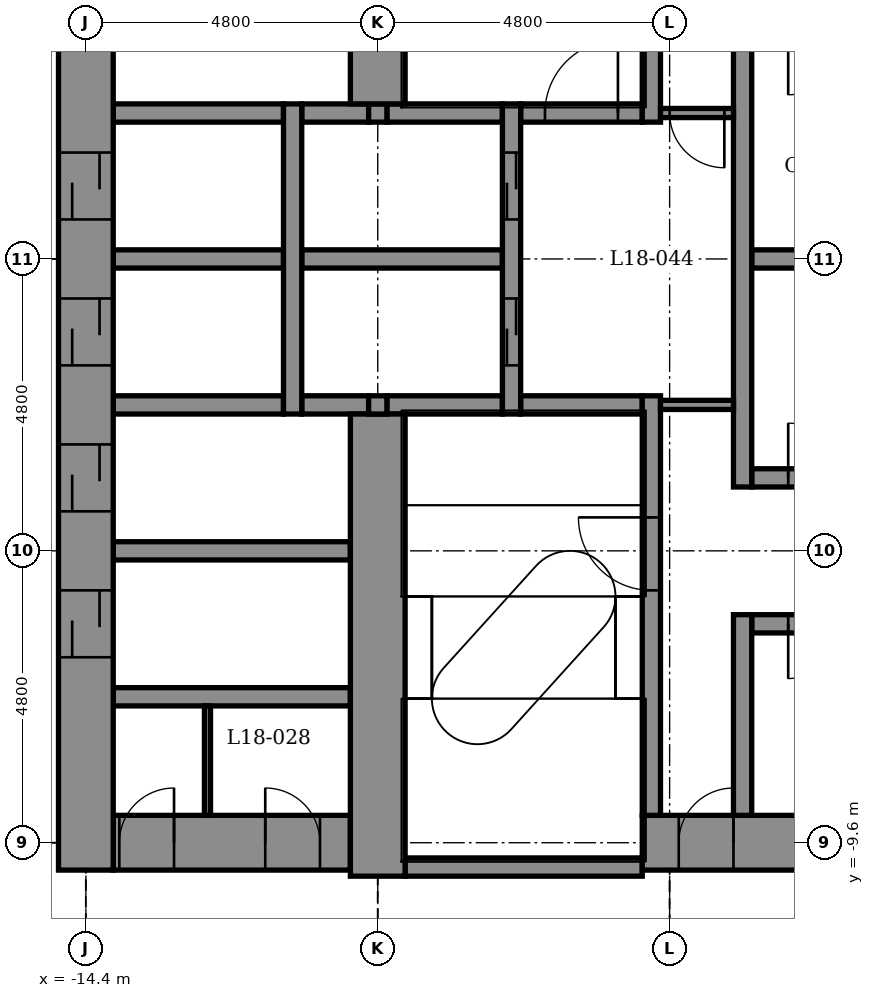
"""IFC4 building model, lengths in metres.
Left out: names, types, materials, properties, quantities, classifications, styles, units other than length and angle.
Written with IfcOpenShell. Run it as: python <this file> out.ifc"""

import sys

from ifc_helpers import new_model, si_unit, direction, frame, frame_2d, origin, place, context, subcontext, project, spatial, rectangle, extrude, element, fill, save


model = new_model("IFC4")
c1 = context("Model", 3, precision=1e-05, world=origin(), true_north=direction((0.0, 1.0)))
c2 = subcontext(c1, "Body", "Model", "MODEL_VIEW")
j1 = project(units=[si_unit("LENGTHUNIT", "METRE"), si_unit("PLANEANGLEUNIT", "RADIAN")], contexts=[c1])
p1 = place(None, origin())
s1 = spatial("IfcSite", under=j1, at=p1, CompositionType="ELEMENT")
p2 = place(p1, origin())
s2 = spatial("IfcBuilding", under=s1, at=p2, CompositionType="ELEMENT")
p3 = place(p2, frame((0.0, 0.0, 95.9)))
s3 = spatial("IfcBuildingStorey", under=s2, at=p3, CompositionType="ELEMENT", Elevation=95.9)
p4 = place(p3, frame((-9.15, -10.0, -0.2), z_axis=(0.0, 0.0, 1.0), x_axis=(1.0, 0.0, 0.0)))
e1 = element("IfcWall", 1, at=p4, inside=s3, PredefinedType="STANDARD", context=c2, shape_type="SweptSolid", body=[
    extrude(rectangle(XDim=3.9, YDim=0.3, at=frame_2d((1.95, 0.0))), origin(), (0.0, 0.0, 1.0), 4.5),
])
p5 = place(p3, frame((-13.95, -9.6, -0.2), z_axis=(0.0, 0.0, 1.0), x_axis=(1.0, 0.0, 0.0)))
e2 = element("IfcWall", 2, at=p5, inside=s3, PredefinedType="SHEAR", context=c2, shape_type="SweptSolid", body=[
    extrude(rectangle(XDim=3.9, YDim=0.9, at=frame_2d((1.95, 0.0))), origin(), (0.0, 0.0, 1.0), 4.5),
])
p6 = place(p5, frame((0.1, 0.0, 0.2)))
e3 = element("IfcOpeningElement", 3, at=p6, cuts=e2, PredefinedType="OPENING", context=c2, shape_type="SweptSolid", body=[
    extrude(rectangle(XDim=0.9, YDim=2.1, at=frame_2d((0.45, 1.05))), frame((0.0, 0.46, 0.0), z_axis=(0.0, -1.0, 0.0), x_axis=(1.0, 0.0, 0.0)), (0.0, 0.0, 1.0), 0.92),
])
p7 = place(p5, frame((2.5, 0.0, 0.2)))
e4 = element("IfcOpeningElement", 4, at=p7, cuts=e2, PredefinedType="OPENING", context=c2, shape_type="SweptSolid", body=[
    extrude(rectangle(XDim=0.9, YDim=2.1, at=frame_2d((0.45, 1.05))), frame((0.0, 0.46, 0.0), z_axis=(0.0, -1.0, 0.0), x_axis=(1.0, 0.0, 0.0)), (0.0, 0.0, 1.0), 0.92),
])
p8 = place(p3, frame((-5.25, -9.6, -0.2), z_axis=(0.0, 0.0, 1.0), x_axis=(1.0, 0.0, 0.0)))
e5 = element("IfcWall", 5, at=p8, inside=s3, PredefinedType="SHEAR", context=c2, shape_type="SweptSolid", body=[
    extrude(rectangle(XDim=10.2, YDim=0.9, at=frame_2d((5.1, 0.0))), origin(), (0.0, 0.0, 1.0), 4.5),
])
p9 = place(p8, frame((0.6, 0.0, 0.2)))
e6 = element("IfcOpeningElement", 6, at=p9, cuts=e5, PredefinedType="OPENING", context=c2, shape_type="SweptSolid", body=[
    extrude(rectangle(XDim=0.9, YDim=2.1, at=frame_2d((0.45, 1.05))), frame((0.0, 0.46, 0.0), z_axis=(0.0, -1.0, 0.0), x_axis=(1.0, 0.0, 0.0)), (0.0, 0.0, 1.0), 0.92),
])
p10 = place(p3, frame((-13.95, -7.2, -0.2), z_axis=(0.0, 0.0, 1.0), x_axis=(1.0, 0.0, 0.0)))
e7 = element("IfcWall", 7, at=p10, inside=s3, PredefinedType="STANDARD", context=c2, shape_type="SweptSolid", body=[
    extrude(rectangle(XDim=3.9, YDim=0.3, at=frame_2d((1.95, 0.0))), origin(), (0.0, 0.0, 1.0), 4.5),
])
p11 = place(p3, frame((-3.45, -6.0, -0.2), z_axis=(0.0, 0.0, 1.0), x_axis=(1.0, 0.0, 0.0)))
e8 = element("IfcWall", 8, at=p11, inside=s3, PredefinedType="STANDARD", context=c2, shape_type="SweptSolid", body=[
    extrude(rectangle(XDim=2.1, YDim=0.3, at=frame_2d((1.05, 0.0))), origin(), (0.0, 0.0, 1.0), 4.5),
])
p12 = place(p11, frame((0.6, 0.0, 0.2)))
e9 = element("IfcOpeningElement", 9, at=p12, cuts=e8, PredefinedType="OPENING", context=c2, shape_type="SweptSolid", body=[
    extrude(rectangle(XDim=0.9, YDim=2.1, at=frame_2d((0.45, 1.05))), frame((0.0, 0.16, 0.0), z_axis=(0.0, -1.0, 0.0), x_axis=(1.0, 0.0, 0.0)), (0.0, 0.0, 1.0), 0.32),
])
p13 = place(p3, frame((-13.95, -4.8, -0.2), z_axis=(0.0, 0.0, 1.0), x_axis=(1.0, 0.0, 0.0)))
e10 = element("IfcWall", 10, at=p13, inside=s3, PredefinedType="STANDARD", context=c2, shape_type="SweptSolid", body=[
    extrude(rectangle(XDim=3.9, YDim=0.3, at=frame_2d((1.95, 0.0))), origin(), (0.0, 0.0, 1.0), 4.5),
])
p14 = place(p3, frame((-3.45, -3.6, -0.2), z_axis=(0.0, 0.0, 1.0), x_axis=(1.0, 0.0, 0.0)))
e11 = element("IfcWall", 11, at=p14, inside=s3, PredefinedType="STANDARD", context=c2, shape_type="SweptSolid", body=[
    extrude(rectangle(XDim=2.1, YDim=0.3, at=frame_2d((1.05, 0.0))), origin(), (0.0, 0.0, 1.0), 4.5),
])
p15 = place(p14, frame((0.6, 0.0, 0.2)))
e12 = element("IfcOpeningElement", 12, at=p15, cuts=e11, PredefinedType="OPENING", context=c2, shape_type="SweptSolid", body=[
    extrude(rectangle(XDim=0.9, YDim=2.1, at=frame_2d((0.45, 1.05))), frame((0.0, 0.16, 0.0), z_axis=(0.0, -1.0, 0.0), x_axis=(1.0, 0.0, 0.0)), (0.0, 0.0, 1.0), 0.32),
])
p16 = place(p3, frame((-13.95, -2.4, -0.2), z_axis=(0.0, 0.0, 1.0), x_axis=(1.0, 0.0, 0.0)))
e13 = element("IfcWall", 13, at=p16, inside=s3, PredefinedType="STANDARD", context=c2, shape_type="SweptSolid", body=[
    extrude(rectangle(XDim=2.8, YDim=0.3, at=frame_2d((1.4, 0.0))), origin(), (0.0, 0.0, 1.0), 4.5),
])
p17 = place(p3, frame((-10.85, -2.4, -0.2), z_axis=(0.0, 0.0, 1.0), x_axis=(1.0, 0.0, 0.0)))
e14 = element("IfcWall", 14, at=p17, inside=s3, PredefinedType="STANDARD", context=c2, shape_type="SweptSolid", body=[
    extrude(rectangle(XDim=1.1, YDim=0.3, at=frame_2d((0.55, 0.0))), origin(), (0.0, 0.0, 1.0), 4.5),
])
p18 = place(p3, frame((-9.45, -2.4, -0.2), z_axis=(0.0, 0.0, 1.0), x_axis=(1.0, 0.0, 0.0)))
e15 = element("IfcWall", 15, at=p18, inside=s3, PredefinedType="STANDARD", context=c2, shape_type="SweptSolid", body=[
    extrude(rectangle(XDim=1.9, YDim=0.3, at=frame_2d((0.95, 0.0))), origin(), (0.0, 0.0, 1.0), 4.5),
])
p19 = place(p3, frame((-7.25, -2.4, -0.2), z_axis=(0.0, 0.0, 1.0), x_axis=(1.0, 0.0, 0.0)))
e16 = element("IfcWall", 16, at=p19, inside=s3, PredefinedType="STANDARD", context=c2, shape_type="SweptSolid", body=[
    extrude(rectangle(XDim=2.0, YDim=0.3, at=frame_2d((1.0, 0.0))), origin(), (0.0, 0.0, 1.0), 4.5),
])
p20 = place(p3, frame((-13.95, 0.0, -0.2), z_axis=(0.0, 0.0, 1.0), x_axis=(1.0, 0.0, 0.0)))
e17 = element("IfcWall", 17, at=p20, inside=s3, PredefinedType="STANDARD", context=c2, shape_type="SweptSolid", body=[
    extrude(rectangle(XDim=2.8, YDim=0.3, at=frame_2d((1.4, 0.0))), origin(), (0.0, 0.0, 1.0), 4.5),
])
p21 = place(p3, frame((-10.85, 0.0, -0.2), z_axis=(0.0, 0.0, 1.0), x_axis=(1.0, 0.0, 0.0)))
e18 = element("IfcWall", 18, at=p21, inside=s3, PredefinedType="STANDARD", context=c2, shape_type="SweptSolid", body=[
    extrude(rectangle(XDim=3.3, YDim=0.3, at=frame_2d((1.65, 0.0))), origin(), (0.0, 0.0, 1.0), 4.5),
])
p22 = place(p3, frame((-3.45, 0.0, -0.2), z_axis=(0.0, 0.0, 1.0), x_axis=(1.0, 0.0, 0.0)))
e19 = element("IfcWall", 19, at=p22, inside=s3, PredefinedType="STANDARD", context=c2, shape_type="SweptSolid", body=[
    extrude(rectangle(XDim=2.1, YDim=0.3, at=frame_2d((1.05, 0.0))), origin(), (0.0, 0.0, 1.0), 4.5),
])
p23 = place(p3, frame((-13.95, 2.4, -0.2), z_axis=(0.0, 0.0, 1.0), x_axis=(1.0, 0.0, 0.0)))
e20 = element("IfcWall", 20, at=p23, inside=s3, PredefinedType="STANDARD", context=c2, shape_type="SweptSolid", body=[
    extrude(rectangle(XDim=2.8, YDim=0.3, at=frame_2d((1.4, 0.0))), origin(), (0.0, 0.0, 1.0), 4.5),
])
p24 = place(p3, frame((-10.85, 2.4, -0.2), z_axis=(0.0, 0.0, 1.0), x_axis=(1.0, 0.0, 0.0)))
e21 = element("IfcWall", 21, at=p24, inside=s3, PredefinedType="STANDARD", context=c2, shape_type="SweptSolid", body=[
    extrude(rectangle(XDim=1.1, YDim=0.3, at=frame_2d((0.55, 0.0))), origin(), (0.0, 0.0, 1.0), 4.5),
])
p25 = place(p3, frame((-9.45, 2.4, -0.2), z_axis=(0.0, 0.0, 1.0), x_axis=(1.0, 0.0, 0.0)))
e22 = element("IfcWall", 22, at=p25, inside=s3, PredefinedType="STANDARD", context=c2, shape_type="SweptSolid", body=[
    extrude(rectangle(XDim=1.9, YDim=0.3, at=frame_2d((0.95, 0.0))), origin(), (0.0, 0.0, 1.0), 4.5),
])
p26 = place(p3, frame((-7.25, 2.4, -0.2), z_axis=(0.0, 0.0, 1.0), x_axis=(1.0, 0.0, 0.0)))
e23 = element("IfcWall", 23, at=p26, inside=s3, PredefinedType="STANDARD", context=c2, shape_type="SweptSolid", body=[
    extrude(rectangle(XDim=2.0, YDim=0.3, at=frame_2d((1.0, 0.0))), origin(), (0.0, 0.0, 1.0), 4.5),
])
p27 = place(p26, frame((0.4, 0.0, 0.2)))
e24 = element("IfcOpeningElement", 24, at=p27, cuts=e23, PredefinedType="OPENING", context=c2, shape_type="SweptSolid", body=[
    extrude(rectangle(XDim=1.2, YDim=2.1, at=frame_2d((0.6, 1.05))), frame((0.0, 0.16, 0.0), z_axis=(0.0, -1.0, 0.0), x_axis=(1.0, 0.0, 0.0)), (0.0, 0.0, 1.0), 0.32),
])
p28 = place(p3, frame((-14.4, -10.05, -0.2), z_axis=(0.0, 0.0, 1.0), x_axis=(0.0, 1.0, 0.0)))
e25 = element("IfcWall", 25, at=p28, inside=s3, PredefinedType="SHEAR", context=c2, shape_type="SweptSolid", body=[
    extrude(rectangle(XDim=20.1, YDim=0.9, at=frame_2d((10.05, 0.0))), origin(), (0.0, 0.0, 1.0), 4.5),
])
p29 = place(p28, frame((3.5, 0.0, 0.2)))
e26 = element("IfcOpeningElement", 26, at=p29, cuts=e25, PredefinedType="OPENING", context=c2, shape_type="SweptSolid", body=[
    extrude(rectangle(XDim=1.1, YDim=2.1, at=frame_2d((0.55, 1.05))), frame((0.0, 0.46, 0.0), z_axis=(0.0, -1.0, 0.0), x_axis=(1.0, 0.0, 0.0)), (0.0, 0.0, 1.0), 0.92),
])
p30 = place(p28, frame((5.9, 0.0, 0.2)))
e27 = element("IfcOpeningElement", 27, at=p30, cuts=e25, PredefinedType="OPENING", context=c2, shape_type="SweptSolid", body=[
    extrude(rectangle(XDim=1.1, YDim=2.1, at=frame_2d((0.55, 1.05))), frame((0.0, 0.46, 0.0), z_axis=(0.0, -1.0, 0.0), x_axis=(1.0, 0.0, 0.0)), (0.0, 0.0, 1.0), 0.92),
])
p31 = place(p28, frame((8.3, 0.0, 0.2)))
e28 = element("IfcOpeningElement", 28, at=p31, cuts=e25, PredefinedType="OPENING", context=c2, shape_type="SweptSolid", body=[
    extrude(rectangle(XDim=1.1, YDim=2.1, at=frame_2d((0.55, 1.05))), frame((0.0, 0.46, 0.0), z_axis=(0.0, -1.0, 0.0), x_axis=(1.0, 0.0, 0.0)), (0.0, 0.0, 1.0), 0.92),
])
p32 = place(p28, frame((10.7, 0.0, 0.2)))
e29 = element("IfcOpeningElement", 29, at=p32, cuts=e25, PredefinedType="OPENING", context=c2, shape_type="SweptSolid", body=[
    extrude(rectangle(XDim=1.1, YDim=2.1, at=frame_2d((0.55, 1.05))), frame((0.0, 0.46, 0.0), z_axis=(0.0, -1.0, 0.0), x_axis=(1.0, 0.0, 0.0)), (0.0, 0.0, 1.0), 0.92),
])
p33 = place(p3, frame((-11.0, -2.55, -0.2), z_axis=(0.0, 0.0, 1.0), x_axis=(0.0, 1.0, 0.0)))
e30 = element("IfcWall", 30, at=p33, inside=s3, PredefinedType="STANDARD", context=c2, shape_type="SweptSolid", body=[
    extrude(rectangle(XDim=5.1, YDim=0.3, at=frame_2d((2.55, 0.0))), origin(), (0.0, 0.0, 1.0), 4.5),
])
p34 = place(p3, frame((-9.6, -10.15, -0.2), z_axis=(0.0, 0.0, 1.0), x_axis=(0.0, 1.0, 0.0)))
e31 = element("IfcWall", 31, at=p34, inside=s3, PredefinedType="SHEAR", context=c2, shape_type="SweptSolid", body=[
    extrude(rectangle(XDim=7.6, YDim=0.9, at=frame_2d((3.8, 0.0))), origin(), (0.0, 0.0, 1.0), 4.5),
])
for number, where, z_axis, x_axis in (
    (32, (-9.6, -2.55, -0.2), (0.0, 0.0, 1.0), (0.0, 1.0, 0.0)),
    (33, (-9.6, 2.25, -0.2), (0.0, 0.0, 1.0), (0.0, 1.0, 0.0)),
):
    element("IfcWall", number, at=place(p3, frame(where, z_axis=z_axis, x_axis=x_axis)), inside=s3, PredefinedType="STANDARD", context=c2, shape_type="SweptSolid", body=[
        extrude(rectangle(XDim=0.3, YDim=0.3, at=frame_2d((0.15, 0.0))), origin(), (0.0, 0.0, 1.0), 4.5),
    ])
p35 = place(p3, frame((-9.6, 2.55, -0.2), z_axis=(0.0, 0.0, 1.0), x_axis=(0.0, 1.0, 0.0)))
e34 = element("IfcWall", 34, at=p35, inside=s3, PredefinedType="SHEAR", context=c2, shape_type="SweptSolid", body=[
    extrude(rectangle(XDim=7.6, YDim=0.9, at=frame_2d((3.8, 0.0))), origin(), (0.0, 0.0, 1.0), 4.5),
])
p36 = place(p3, frame((-7.4, -2.55, -0.2), z_axis=(0.0, 0.0, 1.0), x_axis=(0.0, 1.0, 0.0)))
e35 = element("IfcWall", 35, at=p36, inside=s3, PredefinedType="STANDARD", context=c2, shape_type="SweptSolid", body=[
    extrude(rectangle(XDim=5.1, YDim=0.3, at=frame_2d((2.55, 0.0))), origin(), (0.0, 0.0, 1.0), 4.5),
])
p37 = place(p36, frame((0.8, 0.0, 0.2)))
e36 = element("IfcOpeningElement", 36, at=p37, cuts=e35, PredefinedType="OPENING", context=c2, shape_type="SweptSolid", body=[
    extrude(rectangle(XDim=1.1, YDim=2.1, at=frame_2d((0.55, 1.05))), frame((0.0, 0.16, 0.0), z_axis=(0.0, -1.0, 0.0), x_axis=(1.0, 0.0, 0.0)), (0.0, 0.0, 1.0), 0.32),
])
p38 = place(p36, frame((3.2, 0.0, 0.2)))
e37 = element("IfcOpeningElement", 37, at=p38, cuts=e35, PredefinedType="OPENING", context=c2, shape_type="SweptSolid", body=[
    extrude(rectangle(XDim=1.1, YDim=2.1, at=frame_2d((0.55, 1.05))), frame((0.0, 0.16, 0.0), z_axis=(0.0, -1.0, 0.0), x_axis=(1.0, 0.0, 0.0)), (0.0, 0.0, 1.0), 0.32),
])
p39 = place(p3, frame((-5.1, -9.15, -0.2), z_axis=(0.0, 0.0, 1.0), x_axis=(0.0, 1.0, 0.0)))
e38 = element("IfcWall", 38, at=p39, inside=s3, PredefinedType="STANDARD", context=c2, shape_type="SweptSolid", body=[
    extrude(rectangle(XDim=6.9, YDim=0.3, at=frame_2d((3.45, 0.0))), origin(), (0.0, 0.0, 1.0), 4.5),
])
p40 = place(p39, frame((3.7, 0.0, 0.2)))
e39 = element("IfcOpeningElement", 39, at=p40, cuts=e38, PredefinedType="OPENING", context=c2, shape_type="SweptSolid", body=[
    extrude(rectangle(XDim=1.2, YDim=2.1, at=frame_2d((0.6, 1.05))), frame((0.0, 0.16, 0.0), z_axis=(0.0, -1.0, 0.0), x_axis=(1.0, 0.0, 0.0)), (0.0, 0.0, 1.0), 0.32),
])
p41 = place(p3, frame((-5.1, 2.25, -0.2), z_axis=(0.0, 0.0, 1.0), x_axis=(0.0, 1.0, 0.0)))
e40 = element("IfcWall", 40, at=p41, inside=s3, PredefinedType="STANDARD", context=c2, shape_type="SweptSolid", body=[
    extrude(rectangle(XDim=6.9, YDim=0.3, at=frame_2d((3.45, 0.0))), origin(), (0.0, 0.0, 1.0), 4.5),
])
p42 = place(p41, frame((2.0, 0.0, 0.2)))
e41 = element("IfcOpeningElement", 41, at=p42, cuts=e40, PredefinedType="OPENING", context=c2, shape_type="SweptSolid", body=[
    extrude(rectangle(XDim=1.2, YDim=2.1, at=frame_2d((0.6, 1.05))), frame((0.0, 0.16, 0.0), z_axis=(0.0, -1.0, 0.0), x_axis=(1.0, 0.0, 0.0)), (0.0, 0.0, 1.0), 0.32),
])
p43 = place(p3, frame((-3.6, -9.15, -0.2), z_axis=(0.0, 0.0, 1.0), x_axis=(0.0, 1.0, 0.0)))
e42 = element("IfcWall", 42, at=p43, inside=s3, PredefinedType="STANDARD", context=c2, shape_type="SweptSolid", body=[
    extrude(rectangle(XDim=3.3, YDim=0.3, at=frame_2d((1.65, 0.0))), origin(), (0.0, 0.0, 1.0), 4.5),
])
p44 = place(p3, frame((-3.6, -3.75, -0.2), z_axis=(0.0, 0.0, 1.0), x_axis=(0.0, 1.0, 0.0)))
e43 = element("IfcWall", 43, at=p44, inside=s3, PredefinedType="STANDARD", context=c2, shape_type="SweptSolid", body=[
    extrude(rectangle(XDim=7.5, YDim=0.3, at=frame_2d((3.75, 0.0))), origin(), (0.0, 0.0, 1.0), 4.5),
])
p45 = place(p3, frame((-12.4, -9.15, 0.0), z_axis=(0.0, 0.0, 1.0), x_axis=(0.0, 1.0, 0.0)))
e44 = element("IfcWall", 44, at=p45, inside=s3, PredefinedType="PARTITIONING", context=c2, shape_type="SweptSolid", body=[
    extrude(rectangle(XDim=1.8, YDim=0.1, at=frame_2d((0.9, 0.0))), origin(), (0.0, 0.0, 1.0), 4.3),
])
p46 = place(p3, frame((-4.95, 2.4, 0.0), z_axis=(0.0, 0.0, 1.0), x_axis=(1.0, 0.0, 0.0)))
e45 = element("IfcWall", 45, at=p46, inside=s3, PredefinedType="PARTITIONING", context=c2, shape_type="SweptSolid", body=[
    extrude(rectangle(XDim=1.2, YDim=0.15, at=frame_2d((0.6, 0.0))), origin(), (0.0, 0.0, 1.0), 4.3),
])
p47 = place(p46, frame((0.15, 0.0, 0.0)))
e46 = element("IfcOpeningElement", 46, at=p47, cuts=e45, PredefinedType="OPENING", context=c2, shape_type="SweptSolid", body=[
    extrude(rectangle(XDim=0.9, YDim=2.1, at=frame_2d((0.45, 1.05))), frame((0.0, 0.085, 0.0), z_axis=(0.0, -1.0, 0.0), x_axis=(1.0, 0.0, 0.0)), (0.0, 0.0, 1.0), 0.17),
])
p48 = place(p3, frame((-4.95, -2.4, 0.0), z_axis=(0.0, 0.0, 1.0), x_axis=(1.0, 0.0, 0.0)))
e47 = element("IfcWall", 47, at=p48, inside=s3, PredefinedType="PARTITIONING", context=c2, shape_type="SweptSolid", body=[
    extrude(rectangle(XDim=1.2, YDim=0.15, at=frame_2d((0.6, 0.0))), origin(), (0.0, 0.0, 1.0), 4.3),
])
p49 = place(p37, origin())
e48 = element("IfcDoor", 48, at=p49, inside=s3, OperationType="DOUBLE_DOOR_SLIDING", PredefinedType="DOOR", context=c2, shape_type="SweptSolid", body=[
    extrude(rectangle(XDim=1.1, YDim=2.1, at=frame_2d((0.55, 1.05))), frame((0.0, 0.025, 0.0), z_axis=(0.0, -1.0, 0.0), x_axis=(1.0, 0.0, 0.0)), (0.0, 0.0, 1.0), 0.05),
])
fill(e36, e48)
p50 = place(p38, origin())
e49 = element("IfcDoor", 49, at=p50, inside=s3, OperationType="DOUBLE_DOOR_SLIDING", PredefinedType="DOOR", context=c2, shape_type="SweptSolid", body=[
    extrude(rectangle(XDim=1.1, YDim=2.1, at=frame_2d((0.55, 1.05))), frame((0.0, 0.025, 0.0), z_axis=(0.0, -1.0, 0.0), x_axis=(1.0, 0.0, 0.0)), (0.0, 0.0, 1.0), 0.05),
])
fill(e37, e49)
p51 = place(p29, origin())
e50 = element("IfcDoor", 50, at=p51, inside=s3, OperationType="DOUBLE_DOOR_SLIDING", PredefinedType="DOOR", context=c2, shape_type="SweptSolid", body=[
    extrude(rectangle(XDim=1.1, YDim=2.1, at=frame_2d((0.55, 1.05))), frame((0.0, 0.025, 0.0), z_axis=(0.0, -1.0, 0.0), x_axis=(1.0, 0.0, 0.0)), (0.0, 0.0, 1.0), 0.05),
])
fill(e26, e50)
p52 = place(p30, origin())
e51 = element("IfcDoor", 51, at=p52, inside=s3, OperationType="DOUBLE_DOOR_SLIDING", PredefinedType="DOOR", context=c2, shape_type="SweptSolid", body=[
    extrude(rectangle(XDim=1.1, YDim=2.1, at=frame_2d((0.55, 1.05))), frame((0.0, 0.025, 0.0), z_axis=(0.0, -1.0, 0.0), x_axis=(1.0, 0.0, 0.0)), (0.0, 0.0, 1.0), 0.05),
])
fill(e27, e51)
p53 = place(p31, origin())
e52 = element("IfcDoor", 52, at=p53, inside=s3, OperationType="DOUBLE_DOOR_SLIDING", PredefinedType="DOOR", context=c2, shape_type="SweptSolid", body=[
    extrude(rectangle(XDim=1.1, YDim=2.1, at=frame_2d((0.55, 1.05))), frame((0.0, 0.025, 0.0), z_axis=(0.0, -1.0, 0.0), x_axis=(1.0, 0.0, 0.0)), (0.0, 0.0, 1.0), 0.05),
])
fill(e28, e52)
p54 = place(p32, origin())
e53 = element("IfcDoor", 53, at=p54, inside=s3, OperationType="DOUBLE_DOOR_SLIDING", PredefinedType="DOOR", context=c2, shape_type="SweptSolid", body=[
    extrude(rectangle(XDim=1.1, YDim=2.1, at=frame_2d((0.55, 1.05))), frame((0.0, 0.025, 0.0), z_axis=(0.0, -1.0, 0.0), x_axis=(1.0, 0.0, 0.0)), (0.0, 0.0, 1.0), 0.05),
])
fill(e29, e53)
p55 = place(p40, origin())
e54 = element("IfcDoor", 54, at=p55, inside=s3, OperationType="SINGLE_SWING_RIGHT", PredefinedType="DOOR", context=c2, shape_type="SweptSolid", body=[
    extrude(rectangle(XDim=1.2, YDim=2.1, at=frame_2d((0.6, 1.05))), frame((0.0, 0.025, 0.0), z_axis=(0.0, -1.0, 0.0), x_axis=(1.0, 0.0, 0.0)), (0.0, 0.0, 1.0), 0.05),
])
fill(e39, e54)
p56 = place(p15, origin())
e55 = element("IfcDoor", 55, at=p56, inside=s3, OperationType="SINGLE_SWING_LEFT", PredefinedType="DOOR", context=c2, shape_type="SweptSolid", body=[
    extrude(rectangle(XDim=0.9, YDim=2.1, at=frame_2d((0.45, 1.05))), frame((0.0, 0.025, 0.0), z_axis=(0.0, -1.0, 0.0), x_axis=(1.0, 0.0, 0.0)), (0.0, 0.0, 1.0), 0.05),
])
fill(e12, e55)
p57 = place(p12, frame((0.9, 0.0, 0.0), z_axis=(0.0, 0.0, 1.0), x_axis=(-1.0, 0.0, 0.0)))
e56 = element("IfcDoor", 56, at=p57, inside=s3, OperationType="SINGLE_SWING_LEFT", PredefinedType="DOOR", context=c2, shape_type="SweptSolid", body=[
    extrude(rectangle(XDim=0.9, YDim=2.1, at=frame_2d((0.45, 1.05))), frame((0.0, 0.025, 0.0), z_axis=(0.0, -1.0, 0.0), x_axis=(1.0, 0.0, 0.0)), (0.0, 0.0, 1.0), 0.05),
])
fill(e9, e56)
p58 = place(p6, origin())
e57 = element("IfcDoor", 57, at=p58, inside=s3, OperationType="SINGLE_SWING_RIGHT", PredefinedType="DOOR", context=c2, shape_type="SweptSolid", body=[
    extrude(rectangle(XDim=0.9, YDim=2.1, at=frame_2d((0.45, 1.05))), frame((0.0, 0.025, 0.0), z_axis=(0.0, -1.0, 0.0), x_axis=(1.0, 0.0, 0.0)), (0.0, 0.0, 1.0), 0.05),
])
fill(e3, e57)
p59 = place(p7, origin())
e58 = element("IfcDoor", 58, at=p59, inside=s3, OperationType="SINGLE_SWING_LEFT", PredefinedType="DOOR", context=c2, shape_type="SweptSolid", body=[
    extrude(rectangle(XDim=0.9, YDim=2.1, at=frame_2d((0.45, 1.05))), frame((0.0, 0.025, 0.0), z_axis=(0.0, -1.0, 0.0), x_axis=(1.0, 0.0, 0.0)), (0.0, 0.0, 1.0), 0.05),
])
fill(e4, e58)
p60 = place(p9, origin())
e59 = element("IfcDoor", 59, at=p60, inside=s3, OperationType="SINGLE_SWING_RIGHT", PredefinedType="DOOR", context=c2, shape_type="SweptSolid", body=[
    extrude(rectangle(XDim=0.9, YDim=2.1, at=frame_2d((0.45, 1.05))), frame((0.0, 0.025, 0.0), z_axis=(0.0, -1.0, 0.0), x_axis=(1.0, 0.0, 0.0)), (0.0, 0.0, 1.0), 0.05),
])
fill(e6, e59)
p61 = place(p47, frame((0.9, 0.0, 0.0), z_axis=(0.0, 0.0, 1.0), x_axis=(-1.0, 0.0, 0.0)))
e60 = element("IfcDoor", 60, at=p61, inside=s3, OperationType="SINGLE_SWING_RIGHT", PredefinedType="DOOR", context=c2, shape_type="SweptSolid", body=[
    extrude(rectangle(XDim=0.9, YDim=2.1, at=frame_2d((0.45, 1.05))), frame((0.0, 0.025, 0.0), z_axis=(0.0, -1.0, 0.0), x_axis=(1.0, 0.0, 0.0)), (0.0, 0.0, 1.0), 0.05),
])
fill(e46, e60)
p62 = place(p27, origin())
e61 = element("IfcDoor", 61, at=p62, inside=s3, OperationType="SINGLE_SWING_RIGHT", PredefinedType="DOOR", context=c2, shape_type="SweptSolid", body=[
    extrude(rectangle(XDim=1.2, YDim=2.1, at=frame_2d((0.6, 1.05))), frame((0.0, 0.025, 0.0), z_axis=(0.0, -1.0, 0.0), x_axis=(1.0, 0.0, 0.0)), (0.0, 0.0, 1.0), 0.05),
])
fill(e24, e61)
save(model, sys.argv[1])
